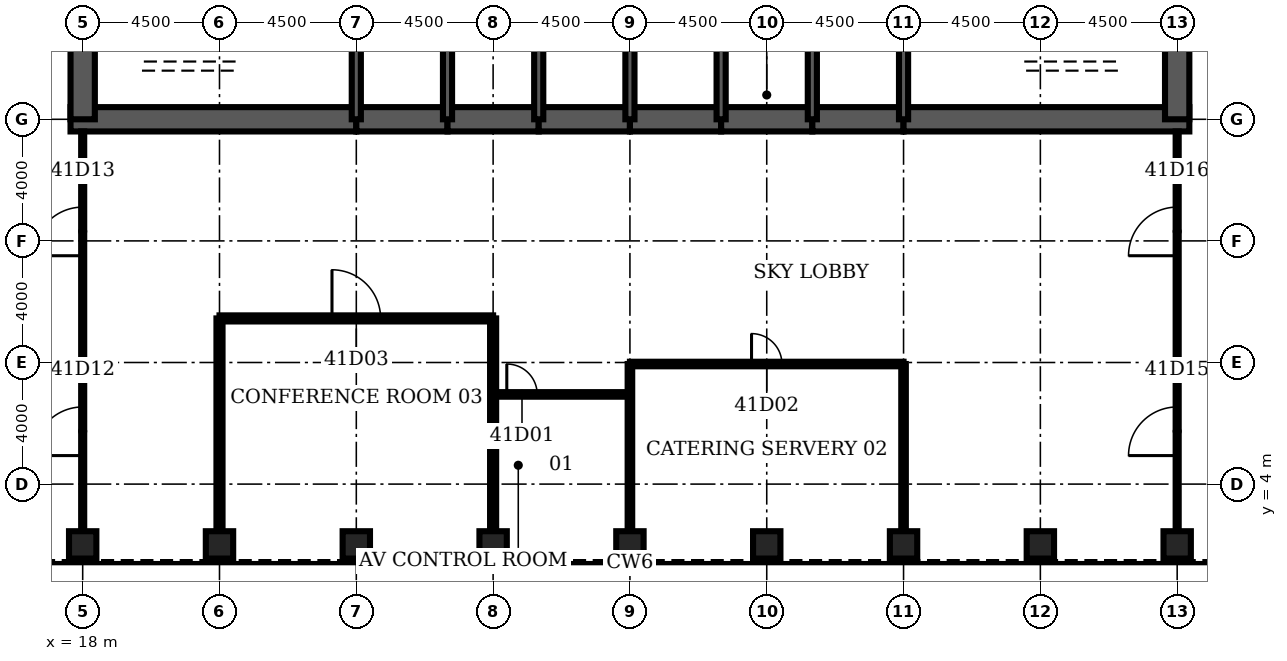
"""IFC4 building model, lengths in metres.
Left out: names, types, materials, properties, quantities, classifications, styles, units other than length and angle.
Written with IfcOpenShell. Run it as: python <this file> out.ifc"""

import sys

from ifc_helpers import new_model, si_unit, direction, frame, frame_2d, origin, origin_2d, place, context, subcontext, project, spatial, rectangle, hollow_rectangle, extrude, element, fill, save


model = new_model("IFC4")
c1 = context("Model", 3, precision=1e-05, world=origin(), true_north=direction((0.0, 1.0)))
c2 = subcontext(c1, "Body", "Model", "MODEL_VIEW")
j1 = project(units=[si_unit("LENGTHUNIT", "METRE"), si_unit("PLANEANGLEUNIT", "RADIAN")], contexts=[c1])
p1 = place(None, origin())
s1 = spatial("IfcSite", under=j1, at=p1, CompositionType="ELEMENT")
p2 = place(p1, origin())
s2 = spatial("IfcBuilding", under=s1, at=p2, CompositionType="ELEMENT")
p3 = place(p2, frame((0.0, 0.0, 185.8)))
s3 = spatial("IfcBuildingStorey", under=s2, at=p3, CompositionType="ELEMENT", Elevation=185.8)
for number, where, z_axis, x_axis in (
    (1, (18.0, 2.0, 0.0), (0.0, 0.0, 1.0), (0.0, 1.0, 0.0)),
    (2, (22.5, 2.0, 0.0), (0.0, 0.0, 1.0), (0.0, 1.0, 0.0)),
    (3, (27.0, 2.0, 0.0), (0.0, 0.0, 1.0), (0.0, 1.0, 0.0)),
    (4, (31.5, 2.0, 0.0), (0.0, 0.0, 1.0), (0.0, 1.0, 0.0)),
    (5, (36.0, 2.0, 0.0), (0.0, 0.0, 1.0), (0.0, 1.0, 0.0)),
    (6, (40.5, 2.0, 0.0), (0.0, 0.0, 1.0), (0.0, 1.0, 0.0)),
    (7, (45.0, 2.0, 0.0), (0.0, 0.0, 1.0), (0.0, 1.0, 0.0)),
    (8, (49.5, 2.0, 0.0), (0.0, 0.0, 1.0), (0.0, 1.0, 0.0)),
    (9, (54.0, 2.0, 0.0), (0.0, 0.0, 1.0), (0.0, 1.0, 0.0)),
):
    element("IfcColumn", number, at=place(p3, frame(where, z_axis=z_axis, x_axis=x_axis)), inside=s3, PredefinedType="COLUMN", context=c2, shape_type="SweptSolid", body=[
        extrude(hollow_rectangle(XDim=0.9, YDim=0.9, WallThickness=0.09, at=origin_2d()), origin(), (0.0, 0.0, 1.0), 4.2),
    ])
p4 = place(p3, frame((17.6, 16.0, 0.0), z_axis=(0.0, 0.0, 1.0), x_axis=(1.0, 0.0, 0.0)))
e10 = element("IfcWall", 10, at=p4, inside=s3, PredefinedType="SHEAR", context=c2, shape_type="SweptSolid", body=[
    extrude(rectangle(XDim=9.4, YDim=0.8, at=frame_2d((4.7, 0.0))), origin(), (0.0, 0.0, 1.0), 4.2),
])
for number, where, z_axis, x_axis in (
    (11, (27.0, 16.0, 0.0), (0.0, 0.0, 1.0), (1.0, 0.0, 0.0)),
    (12, (30.0, 16.0, 0.0), (0.0, 0.0, 1.0), (1.0, 0.0, 0.0)),
    (13, (33.0, 16.0, 0.0), (0.0, 0.0, 1.0), (1.0, 0.0, 0.0)),
    (14, (36.0, 16.0, 0.0), (0.0, 0.0, 1.0), (1.0, 0.0, 0.0)),
    (15, (39.0, 16.0, 0.0), (0.0, 0.0, 1.0), (1.0, 0.0, 0.0)),
    (16, (42.0, 16.0, 0.0), (0.0, 0.0, 1.0), (1.0, 0.0, 0.0)),
):
    element("IfcWall", number, at=place(p3, frame(where, z_axis=z_axis, x_axis=x_axis)), inside=s3, PredefinedType="SHEAR", context=c2, shape_type="SweptSolid", body=[
        extrude(rectangle(XDim=3.0, YDim=0.8, at=frame_2d((1.5, 0.0))), origin(), (0.0, 0.0, 1.0), 4.2),
    ])
p5 = place(p3, frame((45.0, 16.0, 0.0), z_axis=(0.0, 0.0, 1.0), x_axis=(1.0, 0.0, 0.0)))
e17 = element("IfcWall", 17, at=p5, inside=s3, PredefinedType="SHEAR", context=c2, shape_type="SweptSolid", body=[
    extrude(rectangle(XDim=9.4, YDim=0.8, at=frame_2d((4.7, 0.0))), origin(), (0.0, 0.0, 1.0), 4.2),
])
for number, where, z_axis, x_axis in (
    (18, (18.0, 19.2, 0.0), (0.0, 0.0, 1.0), (0.0, -1.0, 0.0)),
    (19, (54.0, 16.0, 0.0), (0.0, 0.0, 1.0), (0.0, 1.0, 0.0)),
):
    element("IfcWall", number, at=place(p3, frame(where, z_axis=z_axis, x_axis=x_axis)), inside=s3, PredefinedType="SHEAR", context=c2, shape_type="SweptSolid", body=[
        extrude(rectangle(XDim=3.2, YDim=0.8, at=frame_2d((1.6, 0.0))), origin(), (0.0, 0.0, 1.0), 4.2),
    ])
for number, where, z_axis, x_axis in (
    (20, (27.0, 16.0, 0.0), (0.0, 0.0, 1.0), (0.0, 1.0, 0.0)),
    (21, (30.0, 16.0, 0.0), (0.0, 0.0, 1.0), (0.0, 1.0, 0.0)),
    (22, (33.0, 16.0, 0.0), (0.0, 0.0, 1.0), (0.0, 1.0, 0.0)),
    (23, (36.0, 16.0, 0.0), (0.0, 0.0, 1.0), (0.0, 1.0, 0.0)),
    (24, (39.0, 16.0, 0.0), (0.0, 0.0, 1.0), (0.0, 1.0, 0.0)),
    (25, (42.0, 16.0, 0.0), (0.0, 0.0, 1.0), (0.0, 1.0, 0.0)),
    (26, (45.0, 16.0, 0.0), (0.0, 0.0, 1.0), (0.0, 1.0, 0.0)),
):
    element("IfcWall", number, at=place(p3, frame(where, z_axis=z_axis, x_axis=x_axis)), inside=s3, PredefinedType="SOLIDWALL", context=c2, shape_type="SweptSolid", body=[
        extrude(rectangle(XDim=3.2, YDim=0.3, at=frame_2d((1.6, 0.0))), origin(), (0.0, 0.0, 1.0), 4.2),
    ])
p6 = place(p3, frame((39.15, 17.35, 0.0), z_axis=(0.0, 0.0, 1.0), x_axis=(1.0, 0.0, 0.0)))
e27 = element("IfcWall", 27, at=p6, inside=s3, PredefinedType="SOLIDWALL", context=c2, shape_type="SweptSolid", body=[
    extrude(rectangle(XDim=2.7, YDim=0.3, at=frame_2d((1.35, 0.0))), origin(), (0.0, 0.0, 1.0), 4.04),
])
p7 = place(p6, frame((0.85, 0.0, 0.0)))
e28 = element("IfcOpeningElement", 28, at=p7, cuts=e27, PredefinedType="OPENING", context=c2, shape_type="SweptSolid", body=[
    extrude(rectangle(XDim=1.0, YDim=2.1, at=frame_2d((0.5, 1.05))), frame((0.0, 0.16, 0.0), z_axis=(0.0, -1.0, 0.0), x_axis=(1.0, 0.0, 0.0)), (0.0, 0.0, 1.0), 0.32),
])
p8 = place(p3, frame((31.5, 6.95, 0.0), z_axis=(0.0, 0.0, 1.0), x_axis=(1.0, 0.0, 0.0)))
e29 = element("IfcWall", 29, at=p8, inside=s3, PredefinedType="PARTITIONING", context=c2, shape_type="SweptSolid", body=[
    extrude(rectangle(XDim=4.5, YDim=0.15, at=frame_2d((2.25, 0.0))), origin(), (0.0, 0.0, 1.0), 3.0),
])
p9 = place(p8, frame((0.45, 0.0, 0.0)))
e30 = element("IfcOpeningElement", 30, at=p9, cuts=e29, PredefinedType="OPENING", context=c2, shape_type="SweptSolid", body=[
    extrude(rectangle(XDim=1.0, YDim=2.1, at=frame_2d((0.5, 1.05))), frame((0.0, 0.085, 0.0), z_axis=(0.0, -1.0, 0.0), x_axis=(1.0, 0.0, 0.0)), (0.0, 0.0, 1.0), 0.17),
])
p10 = place(p3, frame((36.0, 7.95, 0.0), z_axis=(0.0, 0.0, 1.0), x_axis=(1.0, 0.0, 0.0)))
e31 = element("IfcWall", 31, at=p10, inside=s3, PredefinedType="PARTITIONING", context=c2, shape_type="SweptSolid", body=[
    extrude(rectangle(XDim=9.0, YDim=0.15, at=frame_2d((4.5, 0.0))), origin(), (0.0, 0.0, 1.0), 3.0),
])
p11 = place(p10, frame((4.0, 0.0, 0.0)))
e32 = element("IfcOpeningElement", 32, at=p11, cuts=e31, PredefinedType="OPENING", context=c2, shape_type="SweptSolid", body=[
    extrude(rectangle(XDim=1.0, YDim=2.1, at=frame_2d((0.5, 1.05))), frame((0.0, 0.085, 0.0), z_axis=(0.0, -1.0, 0.0), x_axis=(1.0, 0.0, 0.0)), (0.0, 0.0, 1.0), 0.17),
])
p12 = place(p3, frame((22.5, 9.45, 0.0), z_axis=(0.0, 0.0, 1.0), x_axis=(1.0, 0.0, 0.0)))
e33 = element("IfcWall", 33, at=p12, inside=s3, PredefinedType="PARTITIONING", context=c2, shape_type="SweptSolid", body=[
    extrude(rectangle(XDim=9.0, YDim=0.2, at=frame_2d((4.5, 0.0))), origin(), (0.0, 0.0, 1.0), 3.0),
])
p13 = place(p12, frame((3.7, 0.0, 0.0)))
e34 = element("IfcOpeningElement", 34, at=p13, cuts=e33, PredefinedType="OPENING", context=c2, shape_type="SweptSolid", body=[
    extrude(rectangle(XDim=1.6, YDim=2.1, at=frame_2d((0.8, 1.05))), frame((0.0, 0.11, 0.0), z_axis=(0.0, -1.0, 0.0), x_axis=(1.0, 0.0, 0.0)), (0.0, 0.0, 1.0), 0.22),
])
p14 = place(p3, frame((18.0, 2.45, 0.0), z_axis=(0.0, 0.0, 1.0), x_axis=(0.0, 1.0, 0.0)))
e35 = element("IfcWall", 35, at=p14, inside=s3, PredefinedType="PARTITIONING", context=c2, shape_type="SweptSolid", body=[
    extrude(rectangle(XDim=13.15, YDim=0.1, at=frame_2d((6.575, 0.0))), origin(), (0.0, 0.0, 1.0), 3.0),
])
p15 = place(p14, frame((2.488, 0.0, 0.0)))
e36 = element("IfcOpeningElement", 36, at=p15, cuts=e35, PredefinedType="OPENING", context=c2, shape_type="SweptSolid", body=[
    extrude(rectangle(XDim=1.6, YDim=2.1, at=frame_2d((0.8, 1.05))), frame((0.0, 0.06, 0.0), z_axis=(0.0, -1.0, 0.0), x_axis=(1.0, 0.0, 0.0)), (0.0, 0.0, 1.0), 0.12),
])
p16 = place(p14, frame((9.062, 0.0, 0.0)))
e37 = element("IfcOpeningElement", 37, at=p16, cuts=e35, PredefinedType="OPENING", context=c2, shape_type="SweptSolid", body=[
    extrude(rectangle(XDim=1.6, YDim=2.1, at=frame_2d((0.8, 1.05))), frame((0.0, 0.06, 0.0), z_axis=(0.0, -1.0, 0.0), x_axis=(1.0, 0.0, 0.0)), (0.0, 0.0, 1.0), 0.12),
])
for number, where, z_axis, x_axis in (
    (38, (22.5, 2.45, 0.0), (0.0, 0.0, 1.0), (0.0, 1.0, 0.0)),
    (39, (31.5, 2.45, 0.0), (0.0, 0.0, 1.0), (0.0, 1.0, 0.0)),
):
    element("IfcWall", number, at=place(p3, frame(where, z_axis=z_axis, x_axis=x_axis)), inside=s3, PredefinedType="PARTITIONING", context=c2, shape_type="SweptSolid", body=[
        extrude(rectangle(XDim=7.0, YDim=0.2, at=frame_2d((3.5, 0.0))), origin(), (0.0, 0.0, 1.0), 3.0),
    ])
for number, where, z_axis, x_axis in (
    (40, (36.0, 2.45, 0.0), (0.0, 0.0, 1.0), (0.0, 1.0, 0.0)),
    (41, (45.0, 2.45, 0.0), (0.0, 0.0, 1.0), (0.0, 1.0, 0.0)),
):
    element("IfcWall", number, at=place(p3, frame(where, z_axis=z_axis, x_axis=x_axis)), inside=s3, PredefinedType="PARTITIONING", context=c2, shape_type="SweptSolid", body=[
        extrude(rectangle(XDim=5.5, YDim=0.15, at=frame_2d((2.75, 0.0))), origin(), (0.0, 0.0, 1.0), 3.0),
    ])
p17 = place(p3, frame((54.0, 2.45, 0.0), z_axis=(0.0, 0.0, 1.0), x_axis=(0.0, 1.0, 0.0)))
e42 = element("IfcWall", 42, at=p17, inside=s3, PredefinedType="PARTITIONING", context=c2, shape_type="SweptSolid", body=[
    extrude(rectangle(XDim=13.15, YDim=0.1, at=frame_2d((6.575, 0.0))), origin(), (0.0, 0.0, 1.0), 3.0),
])
p18 = place(p17, frame((2.488, 0.0, 0.0)))
e43 = element("IfcOpeningElement", 43, at=p18, cuts=e42, PredefinedType="OPENING", context=c2, shape_type="SweptSolid", body=[
    extrude(rectangle(XDim=1.6, YDim=2.1, at=frame_2d((0.8, 1.05))), frame((0.0, 0.06, 0.0), z_axis=(0.0, -1.0, 0.0), x_axis=(1.0, 0.0, 0.0)), (0.0, 0.0, 1.0), 0.12),
])
p19 = place(p17, frame((9.062, 0.0, 0.0)))
e44 = element("IfcOpeningElement", 44, at=p19, cuts=e42, PredefinedType="OPENING", context=c2, shape_type="SweptSolid", body=[
    extrude(rectangle(XDim=1.6, YDim=2.1, at=frame_2d((0.8, 1.05))), frame((0.0, 0.06, 0.0), z_axis=(0.0, -1.0, 0.0), x_axis=(1.0, 0.0, 0.0)), (0.0, 0.0, 1.0), 0.12),
])
p20 = place(p7, origin())
e45 = element("IfcDoor", 45, at=p20, inside=s3, OperationType="SINGLE_SWING_LEFT", PredefinedType="DOOR", context=c2, shape_type="SweptSolid", body=[
    extrude(rectangle(XDim=1.0, YDim=2.1, at=frame_2d((0.5, 1.05))), frame((0.0, 0.025, 0.0), z_axis=(0.0, -1.0, 0.0), x_axis=(1.0, 0.0, 0.0)), (0.0, 0.0, 1.0), 0.05),
])
fill(e28, e45)
p21 = place(p9, origin())
e46 = element("IfcDoor", 46, at=p21, inside=s3, OperationType="SINGLE_SWING_LEFT", PredefinedType="DOOR", context=c2, shape_type="SweptSolid", body=[
    extrude(rectangle(XDim=1.0, YDim=2.1, at=frame_2d((0.5, 1.05))), frame((0.0, 0.025, 0.0), z_axis=(0.0, -1.0, 0.0), x_axis=(1.0, 0.0, 0.0)), (0.0, 0.0, 1.0), 0.05),
])
fill(e30, e46)
p22 = place(p11, origin())
e47 = element("IfcDoor", 47, at=p22, inside=s3, OperationType="SINGLE_SWING_LEFT", PredefinedType="DOOR", context=c2, shape_type="SweptSolid", body=[
    extrude(rectangle(XDim=1.0, YDim=2.1, at=frame_2d((0.5, 1.05))), frame((0.0, 0.025, 0.0), z_axis=(0.0, -1.0, 0.0), x_axis=(1.0, 0.0, 0.0)), (0.0, 0.0, 1.0), 0.05),
])
fill(e32, e47)
p23 = place(p13, origin())
e48 = element("IfcDoor", 48, at=p23, inside=s3, OperationType="SINGLE_SWING_LEFT", PredefinedType="DOOR", context=c2, shape_type="SweptSolid", body=[
    extrude(rectangle(XDim=1.6, YDim=2.1, at=frame_2d((0.8, 1.05))), frame((0.0, 0.025, 0.0), z_axis=(0.0, -1.0, 0.0), x_axis=(1.0, 0.0, 0.0)), (0.0, 0.0, 1.0), 0.05),
])
fill(e34, e48)
p24 = place(p15, origin())
e49 = element("IfcDoor", 49, at=p24, inside=s3, OperationType="SINGLE_SWING_LEFT", PredefinedType="DOOR", context=c2, shape_type="SweptSolid", body=[
    extrude(rectangle(XDim=1.6, YDim=2.1, at=frame_2d((0.8, 1.05))), frame((0.0, 0.025, 0.0), z_axis=(0.0, -1.0, 0.0), x_axis=(1.0, 0.0, 0.0)), (0.0, 0.0, 1.0), 0.05),
])
fill(e36, e49)
p25 = place(p16, origin())
e50 = element("IfcDoor", 50, at=p25, inside=s3, OperationType="SINGLE_SWING_LEFT", PredefinedType="DOOR", context=c2, shape_type="SweptSolid", body=[
    extrude(rectangle(XDim=1.6, YDim=2.1, at=frame_2d((0.8, 1.05))), frame((0.0, 0.025, 0.0), z_axis=(0.0, -1.0, 0.0), x_axis=(1.0, 0.0, 0.0)), (0.0, 0.0, 1.0), 0.05),
])
fill(e37, e50)
p26 = place(p18, origin())
e51 = element("IfcDoor", 51, at=p26, inside=s3, OperationType="SINGLE_SWING_LEFT", PredefinedType="DOOR", context=c2, shape_type="SweptSolid", body=[
    extrude(rectangle(XDim=1.6, YDim=2.1, at=frame_2d((0.8, 1.05))), frame((0.0, 0.025, 0.0), z_axis=(0.0, -1.0, 0.0), x_axis=(1.0, 0.0, 0.0)), (0.0, 0.0, 1.0), 0.05),
])
fill(e43, e51)
p27 = place(p19, origin())
e52 = element("IfcDoor", 52, at=p27, inside=s3, OperationType="SINGLE_SWING_LEFT", PredefinedType="DOOR", context=c2, shape_type="SweptSolid", body=[
    extrude(rectangle(XDim=1.6, YDim=2.1, at=frame_2d((0.8, 1.05))), frame((0.0, 0.025, 0.0), z_axis=(0.0, -1.0, 0.0), x_axis=(1.0, 0.0, 0.0)), (0.0, 0.0, 1.0), 0.05),
])
fill(e44, e52)
save(model, sys.argv[1])
